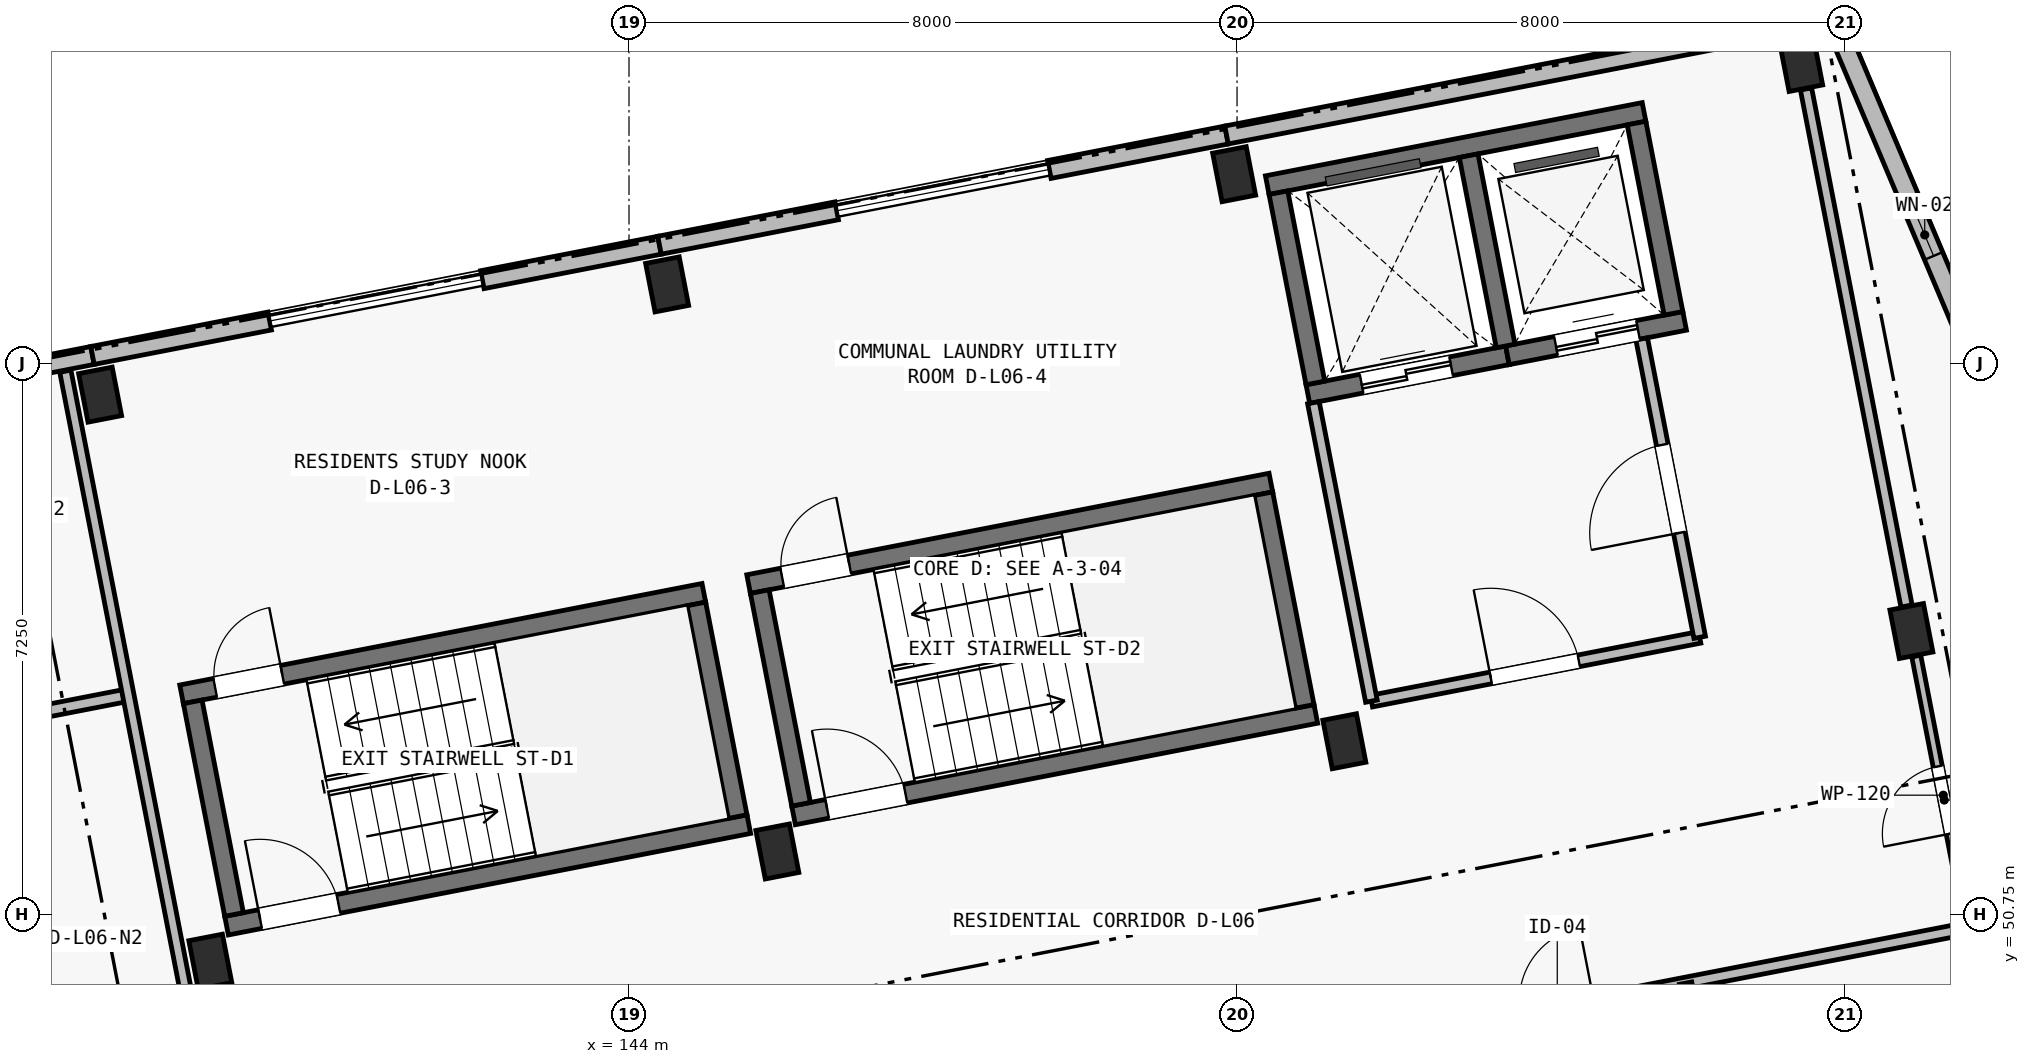
"""IFC4 building model, lengths in metres.
Left out: names, types, materials, properties, quantities, classifications, styles, units other than length and angle.
Written with IfcOpenShell. Run it as: python <this file> out.ifc"""

import sys

from ifc_helpers import new_model, si_unit, direction, frame, frame_2d, origin, origin_2d, place, context, subcontext, project, spatial, rectangle, extrude, element, fill, save


model = new_model("IFC4")
c1 = context("Model", 3, precision=1e-05, world=origin(), true_north=direction((0.0, 1.0)))
c2 = subcontext(c1, "Body", "Model", "MODEL_VIEW")
j1 = project(units=[si_unit("LENGTHUNIT", "METRE"), si_unit("PLANEANGLEUNIT", "RADIAN")], contexts=[c1])
p1 = place(None, origin())
s1 = spatial("IfcSite", under=j1, at=p1, CompositionType="ELEMENT")
p2 = place(p1, origin())
s2 = spatial("IfcBuilding", under=s1, at=p2, CompositionType="ELEMENT")
p3 = place(p2, frame((0.0, 0.0, 21.4)))
s3 = spatial("IfcBuildingStorey", under=s2, at=p3, CompositionType="ELEMENT", Elevation=21.4)
for number, where, z_axis, x_axis in (
    (1, (138.491, 50.13, 0.0), (0.0, 0.0, 1.0), (0.982, 0.191, 0.0)),
    (2, (137.041, 57.59, 0.0), (0.0, 0.0, 1.0), (0.982, 0.191, 0.0)),
    (3, (145.952, 51.58, 0.0), (0.0, 0.0, 1.0), (0.982, 0.191, 0.0)),
    (4, (144.502, 59.041, 0.0), (0.0, 0.0, 1.0), (0.982, 0.191, 0.0)),
    (5, (153.412, 53.03, 0.0), (0.0, 0.0, 1.0), (0.982, 0.191, 0.0)),
    (6, (151.962, 60.491, 0.0), (0.0, 0.0, 1.0), (0.982, 0.191, 0.0)),
    (7, (160.873, 54.48, 0.0), (0.0, 0.0, 1.0), (0.982, 0.191, 0.0)),
    (8, (159.422, 61.941, 0.0), (0.0, 0.0, 1.0), (0.982, 0.191, 0.0)),
):
    element("IfcColumn", number, at=place(p3, frame(where, z_axis=z_axis, x_axis=x_axis)), inside=s3, PredefinedType="COLUMN", context=c2, shape_type="SweptSolid", body=[
        extrude(rectangle(XDim=0.45, YDim=0.65, at=origin_2d()), origin(), (0.0, 0.0, 1.0), 3.25),
    ])
p4 = place(p3, frame((152.397, 60.346, 0.0), z_axis=(0.0, 0.0, 1.0), x_axis=(0.981635261308, 0.190767433692, 0.0)))
e9 = element("IfcWall", 9, at=p4, inside=s3, PredefinedType="SHEAR", context=c2, shape_type="SweptSolid", body=[
    extrude(rectangle(XDim=5.05, YDim=0.25, at=frame_2d((2.525, 0.0))), origin(), (0.0, 0.0, 1.0), 3.25),
])
p5 = place(p3, frame((152.932, 57.598, 0.0), z_axis=(0.0, 0.0, 1.0), x_axis=(0.981636759622, 0.190759723627, 0.0)))
e10 = element("IfcWall", 10, at=p5, inside=s3, PredefinedType="SHEAR", context=c2, shape_type="SweptSolid", body=[
    extrude(rectangle(XDim=2.675, YDim=0.25, at=frame_2d((1.337, 0.0))), origin(), (0.0, 0.0, 1.0), 3.25),
])
p6 = place(p5, frame((0.72, 0.0, 0.0)))
e11 = element("IfcOpeningElement", 11, at=p6, cuts=e10, PredefinedType="OPENING", context=c2, shape_type="SweptSolid", body=[
    extrude(rectangle(XDim=1.2, YDim=2.2, at=frame_2d((0.6, 1.1))), frame((0.0, 0.14, 0.0), z_axis=(0.0, -1.0, 0.0), x_axis=(1.0, 0.0, 0.0)), (0.0, 0.0, 1.0), 0.28),
])
p7 = place(p3, frame((155.558, 58.108, 0.0), z_axis=(0.0, 0.0, 1.0), x_axis=(0.981633573872, 0.190776116556, 0.0)))
e12 = element("IfcWall", 12, at=p7, inside=s3, PredefinedType="SHEAR", context=c2, shape_type="SweptSolid", body=[
    extrude(rectangle(XDim=2.375, YDim=0.25, at=frame_2d((1.188, 0.0))), origin(), (0.0, 0.0, 1.0), 3.25),
])
p8 = place(p7, frame((0.65, 0.0, 0.0)))
e13 = element("IfcOpeningElement", 13, at=p8, cuts=e12, PredefinedType="OPENING", context=c2, shape_type="SweptSolid", body=[
    extrude(rectangle(XDim=1.1, YDim=2.15, at=frame_2d((0.55, 1.075))), frame((0.0, 0.14, 0.0), z_axis=(0.0, -1.0, 0.0), x_axis=(1.0, 0.0, 0.0)), (0.0, 0.0, 1.0), 0.28),
])
for number, where, z_axis, x_axis in (
    (14, (153.031, 57.744, 0.0), (0.0, 0.0, 1.0), (-0.191, 0.982, 0.0)),
    (15, (155.534, 58.231, 0.0), (0.0, 0.0, 1.0), (-0.191, 0.982, 0.0)),
    (16, (157.742, 58.66, 0.0), (0.0, 0.0, 1.0), (-0.191, 0.982, 0.0)),
):
    element("IfcWall", number, at=place(p3, frame(where, z_axis=z_axis, x_axis=x_axis)), inside=s3, PredefinedType="SHEAR", context=c2, shape_type="SweptSolid", body=[
        extrude(rectangle(XDim=2.55, YDim=0.25, at=frame_2d((1.275, 0.0))), origin(), (0.0, 0.0, 1.0), 3.25),
    ])
p9 = place(p3, frame((138.113, 53.647, 0.0), z_axis=(0.0, 0.0, 1.0), x_axis=(0.981626097708, 0.19081458094, 0.0)))
e17 = element("IfcWall", 17, at=p9, inside=s3, PredefinedType="SHEAR", context=c2, shape_type="SweptSolid", body=[
    extrude(rectangle(XDim=7.0, YDim=0.25, at=frame_2d((3.5, 0.0))), origin(), (0.0, 0.0, 1.0), 3.25),
])
p10 = place(p9, frame((0.45, 0.0, 0.0)))
e18 = element("IfcOpeningElement", 18, at=p10, cuts=e17, PredefinedType="OPENING", context=c2, shape_type="SweptSolid", body=[
    extrude(rectangle(XDim=0.9, YDim=2.1, at=frame_2d((0.45, 1.05))), frame((0.0, 0.14, 0.0), z_axis=(0.0, -1.0, 0.0), x_axis=(1.0, 0.0, 0.0)), (0.0, 0.0, 1.0), 0.28),
])
p11 = place(p3, frame((138.705, 50.604, 0.0), z_axis=(0.0, 0.0, 1.0), x_axis=(0.981626097708, 0.19081458094, 0.0)))
e19 = element("IfcWall", 19, at=p11, inside=s3, PredefinedType="SHEAR", context=c2, shape_type="SweptSolid", body=[
    extrude(rectangle(XDim=7.0, YDim=0.25, at=frame_2d((3.5, 0.0))), origin(), (0.0, 0.0, 1.0), 3.25),
])
p12 = place(p11, frame((0.45, 0.0, 0.0)))
e20 = element("IfcOpeningElement", 20, at=p12, cuts=e19, PredefinedType="OPENING", context=c2, shape_type="SweptSolid", body=[
    extrude(rectangle(XDim=1.05, YDim=2.15, at=frame_2d((0.525, 1.075))), frame((0.0, 0.14, 0.0), z_axis=(0.0, -1.0, 0.0), x_axis=(1.0, 0.0, 0.0)), (0.0, 0.0, 1.0), 0.28),
])
p13 = place(p3, frame((138.804, 50.751, 0.0), z_axis=(0.0, 0.0, 1.0), x_axis=(-0.190858194834, 0.981617618762, 0.0)))
e21 = element("IfcWall", 21, at=p13, inside=s3, PredefinedType="SHEAR", context=c2, shape_type="SweptSolid", body=[
    extrude(rectangle(XDim=2.85, YDim=0.25, at=frame_2d((1.425, 0.0))), origin(), (0.0, 0.0, 1.0), 3.25),
])
p14 = place(p3, frame((145.43, 52.039, 0.0), z_axis=(0.0, 0.0, 1.0), x_axis=(-0.190842147128, 0.981620738819, 0.0)))
e22 = element("IfcWall", 22, at=p14, inside=s3, PredefinedType="SHEAR", context=c2, shape_type="SweptSolid", body=[
    extrude(rectangle(XDim=2.85, YDim=0.25, at=frame_2d((1.425, 0.0))), origin(), (0.0, 0.0, 1.0), 3.25),
])
p15 = place(p3, frame((145.574, 55.098, 0.0), z_axis=(0.0, 0.0, 1.0), x_axis=(0.981626097708, 0.19081458094, 0.0)))
e23 = element("IfcWall", 23, at=p15, inside=s3, PredefinedType="SHEAR", context=c2, shape_type="SweptSolid", body=[
    extrude(rectangle(XDim=7.0, YDim=0.25, at=frame_2d((3.5, 0.0))), origin(), (0.0, 0.0, 1.0), 3.25),
])
p16 = place(p15, frame((0.45, 0.0, 0.0)))
e24 = element("IfcOpeningElement", 24, at=p16, cuts=e23, PredefinedType="OPENING", context=c2, shape_type="SweptSolid", body=[
    extrude(rectangle(XDim=0.9, YDim=2.1, at=frame_2d((0.45, 1.05))), frame((0.0, 0.14, 0.0), z_axis=(0.0, -1.0, 0.0), x_axis=(1.0, 0.0, 0.0)), (0.0, 0.0, 1.0), 0.28),
])
p17 = place(p3, frame((146.165, 52.054, 0.0), z_axis=(0.0, 0.0, 1.0), x_axis=(0.981627367538, 0.190808048312, 0.0)))
e25 = element("IfcWall", 25, at=p17, inside=s3, PredefinedType="SHEAR", context=c2, shape_type="SweptSolid", body=[
    extrude(rectangle(XDim=7.0, YDim=0.25, at=frame_2d((3.5, 0.0))), origin(), (0.0, 0.0, 1.0), 3.25),
])
p18 = place(p17, frame((0.45, 0.0, 0.0)))
e26 = element("IfcOpeningElement", 26, at=p18, cuts=e25, PredefinedType="OPENING", context=c2, shape_type="SweptSolid", body=[
    extrude(rectangle(XDim=1.05, YDim=2.15, at=frame_2d((0.525, 1.075))), frame((0.0, 0.14, 0.0), z_axis=(0.0, -1.0, 0.0), x_axis=(1.0, 0.0, 0.0)), (0.0, 0.0, 1.0), 0.28),
])
for number, where, z_axis, x_axis in (
    (27, (146.264, 52.201, 0.0), (0.0, 0.0, 1.0), (-0.191, 0.982, 0.0)),
    (28, (152.89, 53.489, 0.0), (0.0, 0.0, 1.0), (-0.191, 0.982, 0.0)),
):
    element("IfcWall", number, at=place(p3, frame(where, z_axis=z_axis, x_axis=x_axis)), inside=s3, PredefinedType="SHEAR", context=c2, shape_type="SweptSolid", body=[
        extrude(rectangle(XDim=2.85, YDim=0.25, at=frame_2d((1.425, 0.0))), origin(), (0.0, 0.0, 1.0), 3.25),
    ])
p19 = place(p3, frame((129.481, 56.656, 0.0), z_axis=(0.0, 0.0, 1.0), x_axis=(0.981626422232, 0.190812911449, 0.0)))
e29 = element("IfcWall", 29, at=p19, inside=s3, PredefinedType="SOLIDWALL", context=c2, shape_type="SweptSolid", body=[
    extrude(rectangle(XDim=7.6, YDim=0.24, at=frame_2d((3.8, 0.0))), origin(), (0.0, 0.0, 1.0), 3.0),
])
p20 = place(p19, frame((1.384, 0.0, 0.44)))
e30 = element("IfcOpeningElement", 30, at=p20, cuts=e29, PredefinedType="OPENING", context=c2, shape_type="SweptSolid", body=[
    extrude(rectangle(XDim=0.72, YDim=2.16, at=frame_2d((0.36, 1.08))), frame((0.0, 0.135, 0.0), z_axis=(0.0, -1.0, 0.0), x_axis=(1.0, 0.0, 0.0)), (0.0, 0.0, 1.0), 0.27),
])
p21 = place(p19, frame((5.873, 0.0, 0.5)))
e31 = element("IfcOpeningElement", 31, at=p21, cuts=e29, PredefinedType="OPENING", context=c2, shape_type="SweptSolid", body=[
    extrude(rectangle(XDim=0.8, YDim=2.3, at=frame_2d((0.4, 1.15))), frame((0.0, 0.135, 0.0), z_axis=(0.0, -1.0, 0.0), x_axis=(1.0, 0.0, 0.0)), (0.0, 0.0, 1.0), 0.27),
])
for number, where, z_axis, x_axis in (
    (32, (136.941, 58.106, 0.0), (0.0, 0.0, 1.0), (0.982, 0.191, 0.0)),
    (33, (142.07, 59.103, 0.0), (0.0, 0.0, 1.0), (0.982, 0.191, 0.0)),
):
    element("IfcWall", number, at=place(p3, frame(where, z_axis=z_axis, x_axis=x_axis)), inside=s3, PredefinedType="SOLIDWALL", context=c2, shape_type="SweptSolid", body=[
        extrude(rectangle(XDim=2.375, YDim=0.24, at=frame_2d((1.188, 0.0))), origin(), (0.0, 0.0, 1.0), 3.0),
    ])
p22 = place(p3, frame((144.401, 59.556, 0.0), z_axis=(0.0, 0.0, 1.0), x_axis=(0.981633573872, 0.190776116556, 0.0)))
e34 = element("IfcWall", 34, at=p22, inside=s3, PredefinedType="SOLIDWALL", context=c2, shape_type="SweptSolid", body=[
    extrude(rectangle(XDim=2.375, YDim=0.24, at=frame_2d((1.188, 0.0))), origin(), (0.0, 0.0, 1.0), 3.0),
])
p23 = place(p3, frame((149.531, 60.553, 0.0), z_axis=(0.0, 0.0, 1.0), x_axis=(0.98161057432, 0.190894422087, 0.0)))
e35 = element("IfcWall", 35, at=p23, inside=s3, PredefinedType="SOLIDWALL", context=c2, shape_type="SweptSolid", body=[
    extrude(rectangle(XDim=2.375, YDim=0.24, at=frame_2d((1.188, 0.0))), origin(), (0.0, 0.0, 1.0), 3.0),
])
p24 = place(p3, frame((151.862, 61.006, 0.0), z_axis=(0.0, 0.0, 1.0), x_axis=(0.981627273155, 0.190808533872, 0.0)))
e36 = element("IfcWall", 36, at=p24, inside=s3, PredefinedType="SOLIDWALL", context=c2, shape_type="SweptSolid", body=[
    extrude(rectangle(XDim=8.125, YDim=0.24, at=frame_2d((4.062, 0.0))), origin(), (0.0, 0.0, 1.0), 3.0),
])
p25 = place(p3, frame((159.837, 62.556, 0.0), z_axis=(0.0, 0.0, 1.0), x_axis=(0.389225507936, -0.921142499276, 0.0)))
e37 = element("IfcWall", 37, at=p25, inside=s3, PredefinedType="SOLIDWALL", context=c2, shape_type="SweptSolid", body=[
    extrude(rectangle(XDim=17.91, YDim=0.26, at=frame_2d((8.955, 0.0))), origin(), (0.0, 0.0, 1.0), 3.0),
])
p26 = place(p25, frame((2.81, 0.0, 0.45)))
e38 = element("IfcOpeningElement", 38, at=p26, cuts=e37, PredefinedType="OPENING", context=c2, shape_type="SweptSolid", body=[
    extrude(rectangle(XDim=0.6, YDim=2.22, at=frame_2d((0.3, 1.11))), frame((0.0, 0.145, 0.0), z_axis=(0.0, -1.0, 0.0), x_axis=(1.0, 0.0, 0.0)), (0.0, 0.0, 1.0), 0.29),
])
p27 = place(p25, frame((14.36, 0.0, 0.52)))
e39 = element("IfcOpeningElement", 39, at=p27, cuts=e37, PredefinedType="OPENING", context=c2, shape_type="SweptSolid", body=[
    extrude(rectangle(XDim=0.74, YDim=2.26, at=frame_2d((0.37, 1.13))), frame((0.0, 0.145, 0.0), z_axis=(0.0, -1.0, 0.0), x_axis=(1.0, 0.0, 0.0)), (0.0, 0.0, 1.0), 0.29),
])
p28 = place(p3, frame((153.768, 53.558, 0.0), z_axis=(0.0, 0.0, 1.0), x_axis=(0.981624918225, 0.190820648566, 0.0)))
e40 = element("IfcWall", 40, at=p28, inside=s3, PredefinedType="PARTITIONING", context=c2, shape_type="SweptSolid", body=[
    extrude(rectangle(XDim=4.4, YDim=0.155, at=frame_2d((2.2, 0.0))), origin(), (0.0, 0.0, 1.0), 2.97),
])
p29 = place(p28, frame((1.6, 0.0, 0.0)))
e41 = element("IfcOpeningElement", 41, at=p29, cuts=e40, PredefinedType="OPENING", context=c2, shape_type="SweptSolid", body=[
    extrude(rectangle(XDim=1.18, YDim=2.15, at=frame_2d((0.59, 1.075))), frame((0.0, 0.093, 0.0), z_axis=(0.0, -1.0, 0.0), x_axis=(1.0, 0.0, 0.0)), (0.0, 0.0, 1.0), 0.185),
])
p30 = place(p3, frame((153.768, 53.558, 0.0), z_axis=(0.0, 0.0, 1.0), x_axis=(-0.19085495634, 0.981618248425, 0.0)))
e42 = element("IfcWall", 42, at=p30, inside=s3, PredefinedType="PARTITIONING", context=c2, shape_type="SweptSolid", body=[
    extrude(rectangle(XDim=4.0, YDim=0.155, at=frame_2d((2.0, 0.0))), origin(), (0.0, 0.0, 1.0), 2.97),
])
p31 = place(p3, frame((158.087, 54.397, 0.0), z_axis=(0.0, 0.0, 1.0), x_axis=(-0.190796144009, 0.981629681413, 0.0)))
e43 = element("IfcWall", 43, at=p31, inside=s3, PredefinedType="PARTITIONING", context=c2, shape_type="SweptSolid", body=[
    extrude(rectangle(XDim=4.0, YDim=0.155, at=frame_2d((2.0, 0.0))), origin(), (0.0, 0.0, 1.0), 2.97),
])
p32 = place(p31, frame((1.4, 0.0, 0.0)))
e44 = element("IfcOpeningElement", 44, at=p32, cuts=e43, PredefinedType="OPENING", context=c2, shape_type="SweptSolid", body=[
    extrude(rectangle(XDim=1.18, YDim=2.15, at=frame_2d((0.59, 1.075))), frame((0.0, 0.093, 0.0), z_axis=(0.0, -1.0, 0.0), x_axis=(1.0, 0.0, 0.0)), (0.0, 0.0, 1.0), 0.185),
])
p33 = place(p3, frame((161.648, 50.49, 0.0), z_axis=(0.0, 0.0, 1.0), x_axis=(-0.190789073686, 0.981631055622, 0.0)))
e45 = element("IfcWall", 45, at=p33, inside=s3, PredefinedType="PARTITIONING", context=c2, shape_type="SweptSolid", body=[
    extrude(rectangle(XDim=3.73, YDim=0.12, at=frame_2d((1.865, 0.0))), origin(), (0.0, 0.0, 1.0), 2.5),
])
p34 = place(p33, frame((1.35, 0.0, 0.0)))
e46 = element("IfcOpeningElement", 46, at=p34, cuts=e45, PredefinedType="OPENING", context=c2, shape_type="SweptSolid", body=[
    extrude(rectangle(XDim=0.9, YDim=2.1, at=frame_2d((0.45, 1.05))), frame((0.0, 0.075, 0.0), z_axis=(0.0, -1.0, 0.0), x_axis=(1.0, 0.0, 0.0)), (0.0, 0.0, 1.0), 0.15),
])
p35 = place(p3, frame((160.809, 54.809, 0.0), z_axis=(0.0, 0.0, 1.0), x_axis=(-0.190808365525, 0.981627305878, 0.0)))
e47 = element("IfcWall", 47, at=p35, inside=s3, PredefinedType="PARTITIONING", context=c2, shape_type="SweptSolid", body=[
    extrude(rectangle(XDim=6.93, YDim=0.15, at=frame_2d((3.465, 0.0))), origin(), (0.0, 0.0, 1.0), 2.5),
])
p36 = place(p3, frame((154.402, 49.168, 0.0), z_axis=(0.0, 0.0, 1.0), x_axis=(0.981623226858, 0.190829349137, 0.0)))
e48 = element("IfcWall", 48, at=p36, inside=s3, PredefinedType="PARTITIONING", context=c2, shape_type="SweptSolid", body=[
    extrude(rectangle(XDim=7.295, YDim=0.155, at=frame_2d((3.647, 0.0))), origin(), (0.0, 0.0, 1.0), 2.97),
])
p37 = place(p36, frame((1.355, 0.0, 0.0)))
e49 = element("IfcOpeningElement", 49, at=p37, cuts=e48, PredefinedType="OPENING", context=c2, shape_type="SweptSolid", body=[
    extrude(rectangle(XDim=0.98, YDim=2.15, at=frame_2d((0.49, 1.075))), frame((0.0, 0.093, 0.0), z_axis=(0.0, -1.0, 0.0), x_axis=(1.0, 0.0, 0.0)), (0.0, 0.0, 1.0), 0.185),
])
p38 = place(p3, frame((158.583, 46.344, 0.0), z_axis=(0.0, 0.0, 1.0), x_axis=(-0.190865998276, 0.981616101489, 0.0)))
e50 = element("IfcWall", 50, at=p38, inside=s3, PredefinedType="PLUMBINGWALL", context=c2, shape_type="SweptSolid", body=[
    extrude(rectangle(XDim=3.57, YDim=0.165, at=frame_2d((1.785, 0.0))), origin(), (0.0, 0.0, 1.0), 2.97),
])
p39 = place(p3, frame((134.065, 52.988, 0.0), z_axis=(0.0, 0.0, 1.0), x_axis=(0.981629173664, 0.190798756314, 0.0)))
e51 = element("IfcWall", 51, at=p39, inside=s3, PredefinedType="PLUMBINGWALL", context=c2, shape_type="SweptSolid", body=[
    extrude(rectangle(XDim=3.41, YDim=0.165, at=frame_2d((1.705, 0.0))), origin(), (0.0, 0.0, 1.0), 2.97),
])
p40 = place(p39, frame((1.295, 0.0, 0.0)))
e52 = element("IfcOpeningElement", 52, at=p40, cuts=e51, PredefinedType="OPENING", context=c2, shape_type="SweptSolid", body=[
    extrude(rectangle(XDim=0.82, YDim=2.08, at=frame_2d((0.41, 1.04))), frame((0.0, 0.097, 0.0), z_axis=(0.0, -1.0, 0.0), x_axis=(1.0, 0.0, 0.0)), (0.0, 0.0, 1.0), 0.195),
])
p41 = place(p3, frame((138.467, 48.21, 0.0), z_axis=(0.0, 0.0, 1.0), x_axis=(-0.190814044018, 0.981626202078, 0.0)))
e53 = element("IfcWall", 53, at=p41, inside=s3, PredefinedType="PARTITIONING", context=c2, shape_type="SweptSolid", body=[
    extrude(rectangle(XDim=9.87, YDim=0.15, at=frame_2d((4.935, 0.0))), origin(), (0.0, 0.0, 1.0), 2.97),
])
p42 = place(p26, origin())
e54 = element("IfcWindow", 54, at=p42, inside=s3, PartitioningType="SINGLE_PANEL", PredefinedType="WINDOW", context=c2, shape_type="SweptSolid", body=[
    extrude(rectangle(XDim=0.6, YDim=2.22, at=frame_2d((0.3, 1.11))), frame((0.0, 0.03, 0.0), z_axis=(0.0, -1.0, 0.0), x_axis=(1.0, 0.0, 0.0)), (0.0, 0.0, 1.0), 0.06),
])
fill(e38, e54)
p43 = place(p29, origin())
e55 = element("IfcDoor", 55, at=p43, inside=s3, OperationType="SINGLE_SWING_LEFT", PredefinedType="DOOR", context=c2, shape_type="SweptSolid", body=[
    extrude(rectangle(XDim=1.18, YDim=2.15, at=frame_2d((0.59, 1.075))), frame((0.0, 0.025, 0.0), z_axis=(0.0, -1.0, 0.0), x_axis=(1.0, 0.0, 0.0)), (0.0, 0.0, 1.0), 0.05),
])
fill(e41, e55)
p44 = place(p32, origin())
e56 = element("IfcDoor", 56, at=p44, inside=s3, OperationType="SINGLE_SWING_LEFT", PredefinedType="DOOR", context=c2, shape_type="SweptSolid", body=[
    extrude(rectangle(XDim=1.18, YDim=2.15, at=frame_2d((0.59, 1.075))), frame((0.0, 0.025, 0.0), z_axis=(0.0, -1.0, 0.0), x_axis=(1.0, 0.0, 0.0)), (0.0, 0.0, 1.0), 0.05),
])
fill(e44, e56)
p45 = place(p34, origin())
e57 = element("IfcDoor", 57, at=p45, inside=s3, OperationType="SINGLE_SWING_LEFT", PredefinedType="DOOR", context=c2, shape_type="SweptSolid", body=[
    extrude(rectangle(XDim=0.9, YDim=2.1, at=frame_2d((0.45, 1.05))), frame((0.0, 0.025, 0.0), z_axis=(0.0, -1.0, 0.0), x_axis=(1.0, 0.0, 0.0)), (0.0, 0.0, 1.0), 0.05),
])
fill(e46, e57)
p46 = place(p12, origin())
e58 = element("IfcDoor", 58, at=p46, inside=s3, OperationType="SINGLE_SWING_LEFT", PredefinedType="DOOR", context=c2, shape_type="SweptSolid", body=[
    extrude(rectangle(XDim=1.05, YDim=2.15, at=frame_2d((0.525, 1.075))), frame((0.0, 0.025, 0.0), z_axis=(0.0, -1.0, 0.0), x_axis=(1.0, 0.0, 0.0)), (0.0, 0.0, 1.0), 0.05),
])
fill(e20, e58)
p47 = place(p10, origin())
e59 = element("IfcDoor", 59, at=p47, inside=s3, OperationType="SINGLE_SWING_RIGHT", PredefinedType="DOOR", context=c2, shape_type="SweptSolid", body=[
    extrude(rectangle(XDim=0.9, YDim=2.1, at=frame_2d((0.45, 1.05))), frame((0.0, 0.025, 0.0), z_axis=(0.0, -1.0, 0.0), x_axis=(1.0, 0.0, 0.0)), (0.0, 0.0, 1.0), 0.05),
])
fill(e18, e59)
p48 = place(p18, origin())
e60 = element("IfcDoor", 60, at=p48, inside=s3, OperationType="SINGLE_SWING_LEFT", PredefinedType="DOOR", context=c2, shape_type="SweptSolid", body=[
    extrude(rectangle(XDim=1.05, YDim=2.15, at=frame_2d((0.525, 1.075))), frame((0.0, 0.025, 0.0), z_axis=(0.0, -1.0, 0.0), x_axis=(1.0, 0.0, 0.0)), (0.0, 0.0, 1.0), 0.05),
])
fill(e26, e60)
p49 = place(p16, origin())
e61 = element("IfcDoor", 61, at=p49, inside=s3, OperationType="SINGLE_SWING_RIGHT", PredefinedType="DOOR", context=c2, shape_type="SweptSolid", body=[
    extrude(rectangle(XDim=0.9, YDim=2.1, at=frame_2d((0.45, 1.05))), frame((0.0, 0.025, 0.0), z_axis=(0.0, -1.0, 0.0), x_axis=(1.0, 0.0, 0.0)), (0.0, 0.0, 1.0), 0.05),
])
fill(e24, e61)
p50 = place(p6, origin())
e62 = element("IfcDoor", 62, at=p50, inside=s3, OperationType="DOUBLE_DOOR_SLIDING", PredefinedType="DOOR", context=c2, shape_type="SweptSolid", body=[
    extrude(rectangle(XDim=1.2, YDim=2.2, at=frame_2d((0.6, 1.1))), frame((0.0, 0.025, 0.0), z_axis=(0.0, -1.0, 0.0), x_axis=(1.0, 0.0, 0.0)), (0.0, 0.0, 1.0), 0.05),
])
fill(e11, e62)
p51 = place(p8, origin())
e63 = element("IfcDoor", 63, at=p51, inside=s3, OperationType="DOUBLE_DOOR_SLIDING", PredefinedType="DOOR", context=c2, shape_type="SweptSolid", body=[
    extrude(rectangle(XDim=1.1, YDim=2.15, at=frame_2d((0.55, 1.075))), frame((0.0, 0.025, 0.0), z_axis=(0.0, -1.0, 0.0), x_axis=(1.0, 0.0, 0.0)), (0.0, 0.0, 1.0), 0.05),
])
fill(e13, e63)
save(model, sys.argv[1])
